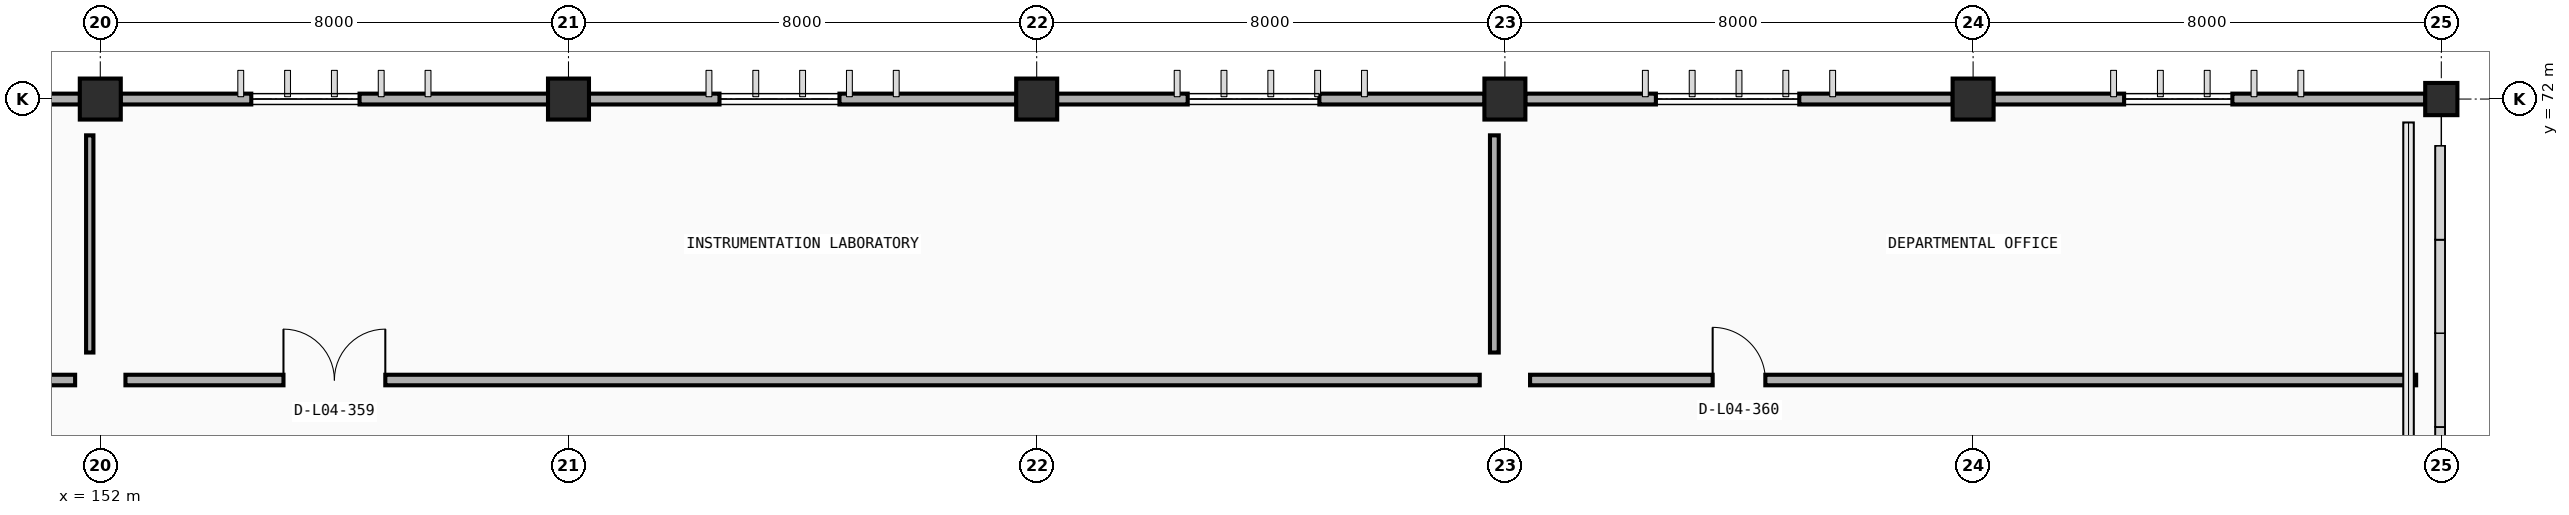
"""IFC4 building model, lengths in metres.
Left out: names, types, materials, properties, quantities, classifications, styles, units other than length and angle.
Written with IfcOpenShell. Run it as: python <this file> out.ifc"""

import sys

from ifc_helpers import new_model, si_unit, direction, frame, frame_2d, origin, origin_2d, place, context, subcontext, project, spatial, rectangle, extrude, element, fill, save


model = new_model("IFC4")
c1 = context("Model", 3, precision=1e-05, world=origin(), true_north=direction((0.0, 1.0)))
c2 = subcontext(c1, "Body", "Model", "MODEL_VIEW")
j1 = project(units=[si_unit("LENGTHUNIT", "METRE"), si_unit("PLANEANGLEUNIT", "RADIAN")], contexts=[c1])
p1 = place(None, origin())
s1 = spatial("IfcSite", under=j1, at=p1, CompositionType="ELEMENT")
p2 = place(p1, origin())
s2 = spatial("IfcBuilding", under=s1, at=p2, CompositionType="ELEMENT")
p3 = place(p2, frame((0.0, 0.0, 13.8)))
s3 = spatial("IfcBuildingStorey", under=s2, at=p3, CompositionType="ELEMENT", Elevation=13.8)
for number, where, z_axis, x_axis in (
    (1, (152.0, 72.0, 0.0), (0.0, 0.0, 1.0), (1.0, 0.0, 0.0)),
    (2, (160.0, 72.0, 0.0), (0.0, 0.0, 1.0), (1.0, 0.0, 0.0)),
    (3, (168.0, 72.0, 0.0), (0.0, 0.0, 1.0), (1.0, 0.0, 0.0)),
    (4, (176.0, 72.0, 0.0), (0.0, 0.0, 1.0), (1.0, 0.0, 0.0)),
    (5, (184.0, 72.0, 0.0), (0.0, 0.0, 1.0), (1.0, 0.0, 0.0)),
):
    element("IfcColumn", number, at=place(p3, frame(where, z_axis=z_axis, x_axis=x_axis)), inside=s3, PredefinedType="COLUMN", context=c2, shape_type="SweptSolid", body=[
        extrude(rectangle(XDim=0.7, YDim=0.7, at=origin_2d()), origin(), (0.0, 0.0, 1.0), 4.2),
    ])
p4 = place(p3, frame((192.0, 72.0, 0.0), z_axis=(0.0, 0.0, 1.0), x_axis=(1.0, 0.0, 0.0)))
e6 = element("IfcColumn", 6, at=p4, inside=s3, PredefinedType="COLUMN", context=c2, shape_type="SweptSolid", body=[
    extrude(rectangle(XDim=0.55, YDim=0.55, at=origin_2d()), origin(), (0.0, 0.0, 1.0), 4.2),
])
p5 = place(p3, frame((144.347, 72.0, 0.0), z_axis=(0.0, 0.0, 1.0), x_axis=(1.0, 0.0, 0.0)))
e7 = element("IfcWall", 7, at=p5, inside=s3, PredefinedType="STANDARD", context=c2, shape_type="SweptSolid", body=[
    extrude(rectangle(XDim=7.306, YDim=0.185, at=frame_2d((3.653, 0.0))), origin(), (0.0, 0.0, 1.0), 3.325),
])
p6 = place(p5, frame((2.233, 0.0, 0.9)))
e8 = element("IfcOpeningElement", 8, at=p6, cuts=e7, PredefinedType="OPENING", context=c2, shape_type="SweptSolid", body=[
    extrude(rectangle(XDim=2.45, YDim=2.0, at=frame_2d((1.225, 1.0))), frame((0.0, 0.103, 0.0), z_axis=(0.0, -1.0, 0.0), x_axis=(1.0, 0.0, 0.0)), (0.0, 0.0, 1.0), 0.205),
])
p7 = place(p3, frame((152.347, 72.0, 0.0), z_axis=(0.0, 0.0, 1.0), x_axis=(1.0, 0.0, 0.0)))
e9 = element("IfcWall", 9, at=p7, inside=s3, PredefinedType="STANDARD", context=c2, shape_type="SweptSolid", body=[
    extrude(rectangle(XDim=7.306, YDim=0.185, at=frame_2d((3.653, 0.0))), origin(), (0.0, 0.0, 1.0), 3.325),
])
p8 = place(p7, frame((2.233, 0.0, 0.9)))
e10 = element("IfcOpeningElement", 10, at=p8, cuts=e9, PredefinedType="OPENING", context=c2, shape_type="SweptSolid", body=[
    extrude(rectangle(XDim=1.85, YDim=2.0, at=frame_2d((0.925, 1.0))), frame((0.0, 0.103, 0.0), z_axis=(0.0, -1.0, 0.0), x_axis=(1.0, 0.0, 0.0)), (0.0, 0.0, 1.0), 0.205),
])
p9 = place(p3, frame((160.347, 72.0, 0.0), z_axis=(0.0, 0.0, 1.0), x_axis=(1.0, 0.0, 0.0)))
e11 = element("IfcWall", 11, at=p9, inside=s3, PredefinedType="STANDARD", context=c2, shape_type="SweptSolid", body=[
    extrude(rectangle(XDim=7.306, YDim=0.185, at=frame_2d((3.653, 0.0))), origin(), (0.0, 0.0, 1.0), 3.325),
])
p10 = place(p9, frame((2.233, 0.0, 0.9)))
e12 = element("IfcOpeningElement", 12, at=p10, cuts=e11, PredefinedType="OPENING", context=c2, shape_type="SweptSolid", body=[
    extrude(rectangle(XDim=2.05, YDim=2.0, at=frame_2d((1.025, 1.0))), frame((0.0, 0.103, 0.0), z_axis=(0.0, -1.0, 0.0), x_axis=(1.0, 0.0, 0.0)), (0.0, 0.0, 1.0), 0.205),
])
p11 = place(p3, frame((168.347, 72.0, 0.0), z_axis=(0.0, 0.0, 1.0), x_axis=(1.0, 0.0, 0.0)))
e13 = element("IfcWall", 13, at=p11, inside=s3, PredefinedType="STANDARD", context=c2, shape_type="SweptSolid", body=[
    extrude(rectangle(XDim=7.306, YDim=0.185, at=frame_2d((3.653, 0.0))), origin(), (0.0, 0.0, 1.0), 3.325),
])
p12 = place(p11, frame((2.233, 0.0, 0.9)))
e14 = element("IfcOpeningElement", 14, at=p12, cuts=e13, PredefinedType="OPENING", context=c2, shape_type="SweptSolid", body=[
    extrude(rectangle(XDim=2.25, YDim=2.0, at=frame_2d((1.125, 1.0))), frame((0.0, 0.103, 0.0), z_axis=(0.0, -1.0, 0.0), x_axis=(1.0, 0.0, 0.0)), (0.0, 0.0, 1.0), 0.205),
])
p13 = place(p3, frame((176.347, 72.0, 0.0), z_axis=(0.0, 0.0, 1.0), x_axis=(1.0, 0.0, 0.0)))
e15 = element("IfcWall", 15, at=p13, inside=s3, PredefinedType="STANDARD", context=c2, shape_type="SweptSolid", body=[
    extrude(rectangle(XDim=7.306, YDim=0.185, at=frame_2d((3.653, 0.0))), origin(), (0.0, 0.0, 1.0), 3.325),
])
p14 = place(p13, frame((2.233, 0.0, 0.9)))
e16 = element("IfcOpeningElement", 16, at=p14, cuts=e15, PredefinedType="OPENING", context=c2, shape_type="SweptSolid", body=[
    extrude(rectangle(XDim=2.45, YDim=2.0, at=frame_2d((1.225, 1.0))), frame((0.0, 0.103, 0.0), z_axis=(0.0, -1.0, 0.0), x_axis=(1.0, 0.0, 0.0)), (0.0, 0.0, 1.0), 0.205),
])
p15 = place(p3, frame((184.347, 72.0, 0.0), z_axis=(0.0, 0.0, 1.0), x_axis=(1.0, 0.0, 0.0)))
e17 = element("IfcWall", 17, at=p15, inside=s3, PredefinedType="STANDARD", context=c2, shape_type="SweptSolid", body=[
    extrude(rectangle(XDim=7.381, YDim=0.185, at=frame_2d((3.69, 0.0))), origin(), (0.0, 0.0, 1.0), 3.325),
])
p16 = place(p15, frame((2.233, 0.0, 0.9)))
e18 = element("IfcOpeningElement", 18, at=p16, cuts=e17, PredefinedType="OPENING", context=c2, shape_type="SweptSolid", body=[
    extrude(rectangle(XDim=1.85, YDim=2.0, at=frame_2d((0.925, 1.0))), frame((0.0, 0.103, 0.0), z_axis=(0.0, -1.0, 0.0), x_axis=(1.0, 0.0, 0.0)), (0.0, 0.0, 1.0), 0.205),
])
p17 = place(p3, frame((191.76, 71.78, 0.0), z_axis=(0.0, 0.0, 1.0), x_axis=(-1.0, 0.0, 0.0)))
e19 = element("IfcWall", 19, at=p17, inside=s3, PredefinedType="PARAPET", context=c2, shape_type="SweptSolid", body=[
    extrude(rectangle(XDim=0.32, YDim=0.2, at=frame_2d((0.16, 0.0))), origin(), (0.0, 0.0, 1.0), 3.35),
])
p18 = place(p3, frame((136.43, 67.2, 0.0), z_axis=(0.0, 0.0, 1.0), x_axis=(1.0, 0.0, 0.0)))
e20 = element("IfcWall", 20, at=p18, inside=s3, PredefinedType="PARTITIONING", context=c2, shape_type="SweptSolid", body=[
    extrude(rectangle(XDim=15.14, YDim=0.18, at=frame_2d((7.57, 0.0))), origin(), (0.0, 0.0, 1.0), 3.3),
])
p19 = place(p18, frame((2.73, 0.0, 0.0)))
e21 = element("IfcOpeningElement", 21, at=p19, cuts=e20, PredefinedType="OPENING", context=c2, shape_type="SweptSolid", body=[
    extrude(rectangle(XDim=1.68, YDim=2.25, at=frame_2d((0.84, 1.125))), frame((0.0, 0.1, 0.0), z_axis=(0.0, -1.0, 0.0), x_axis=(1.0, 0.0, 0.0)), (0.0, 0.0, 1.0), 0.2),
])
p20 = place(p3, frame((151.82, 67.67, 0.0), z_axis=(0.0, 0.0, 1.0), x_axis=(0.0, 1.0, 0.0)))
e22 = element("IfcWall", 22, at=p20, inside=s3, PredefinedType="PARTITIONING", context=c2, shape_type="SweptSolid", body=[
    extrude(rectangle(XDim=3.71, YDim=0.125, at=frame_2d((1.855, 0.0))), origin(), (0.0, 0.0, 1.0), 3.225),
])
p21 = place(p3, frame((152.43, 67.2, 0.0), z_axis=(0.0, 0.0, 1.0), x_axis=(1.0, 0.0, 0.0)))
e23 = element("IfcWall", 23, at=p21, inside=s3, PredefinedType="PARTITIONING", context=c2, shape_type="SweptSolid", body=[
    extrude(rectangle(XDim=23.14, YDim=0.18, at=frame_2d((11.57, 0.0))), origin(), (0.0, 0.0, 1.0), 3.3),
])
p22 = place(p21, frame((2.7, 0.0, 0.0)))
e24 = element("IfcOpeningElement", 24, at=p22, cuts=e23, PredefinedType="OPENING", context=c2, shape_type="SweptSolid", body=[
    extrude(rectangle(XDim=1.74, YDim=2.22, at=frame_2d((0.87, 1.11))), frame((0.0, 0.1, 0.0), z_axis=(0.0, -1.0, 0.0), x_axis=(1.0, 0.0, 0.0)), (0.0, 0.0, 1.0), 0.2),
])
p23 = place(p3, frame((175.82, 67.67, 0.0), z_axis=(0.0, 0.0, 1.0), x_axis=(0.0, 1.0, 0.0)))
e25 = element("IfcWall", 25, at=p23, inside=s3, PredefinedType="PARTITIONING", context=c2, shape_type="SweptSolid", body=[
    extrude(rectangle(XDim=3.71, YDim=0.15, at=frame_2d((1.855, 0.0))), origin(), (0.0, 0.0, 1.0), 3.225),
])
p24 = place(p3, frame((176.43, 67.2, 0.0), z_axis=(0.0, 0.0, 1.0), x_axis=(1.0, 0.0, 0.0)))
e26 = element("IfcWall", 26, at=p24, inside=s3, PredefinedType="PARTITIONING", context=c2, shape_type="SweptSolid", body=[
    extrude(rectangle(XDim=15.14, YDim=0.18, at=frame_2d((7.57, 0.0))), origin(), (0.0, 0.0, 1.0), 3.3),
])
p25 = place(p24, frame((3.12, 0.0, 0.0)))
e27 = element("IfcOpeningElement", 27, at=p25, cuts=e26, PredefinedType="OPENING", context=c2, shape_type="SweptSolid", body=[
    extrude(rectangle(XDim=0.9, YDim=2.1, at=frame_2d((0.45, 1.05))), frame((0.0, 0.1, 0.0), z_axis=(0.0, -1.0, 0.0), x_axis=(1.0, 0.0, 0.0)), (0.0, 0.0, 1.0), 0.2),
])
p26 = place(p8, origin())
e28 = element("IfcWindow", 28, at=p26, inside=s3, PartitioningType="DOUBLE_PANEL_VERTICAL", PredefinedType="WINDOW", context=c2, shape_type="SweptSolid", body=[
    extrude(rectangle(XDim=1.85, YDim=2.0, at=frame_2d((0.925, 1.0))), frame((0.0, 0.03, 0.0), z_axis=(0.0, -1.0, 0.0), x_axis=(1.0, 0.0, 0.0)), (0.0, 0.0, 1.0), 0.06),
])
fill(e10, e28)
p27 = place(p10, origin())
e29 = element("IfcWindow", 29, at=p27, inside=s3, PartitioningType="DOUBLE_PANEL_VERTICAL", PredefinedType="WINDOW", context=c2, shape_type="SweptSolid", body=[
    extrude(rectangle(XDim=2.05, YDim=2.0, at=frame_2d((1.025, 1.0))), frame((0.0, 0.03, 0.0), z_axis=(0.0, -1.0, 0.0), x_axis=(1.0, 0.0, 0.0)), (0.0, 0.0, 1.0), 0.06),
])
fill(e12, e29)
p28 = place(p12, origin())
e30 = element("IfcWindow", 30, at=p28, inside=s3, PartitioningType="DOUBLE_PANEL_VERTICAL", PredefinedType="WINDOW", context=c2, shape_type="SweptSolid", body=[
    extrude(rectangle(XDim=2.25, YDim=2.0, at=frame_2d((1.125, 1.0))), frame((0.0, 0.03, 0.0), z_axis=(0.0, -1.0, 0.0), x_axis=(1.0, 0.0, 0.0)), (0.0, 0.0, 1.0), 0.06),
])
fill(e14, e30)
p29 = place(p14, origin())
e31 = element("IfcWindow", 31, at=p29, inside=s3, PartitioningType="DOUBLE_PANEL_VERTICAL", PredefinedType="WINDOW", context=c2, shape_type="SweptSolid", body=[
    extrude(rectangle(XDim=2.45, YDim=2.0, at=frame_2d((1.225, 1.0))), frame((0.0, 0.03, 0.0), z_axis=(0.0, -1.0, 0.0), x_axis=(1.0, 0.0, 0.0)), (0.0, 0.0, 1.0), 0.06),
])
fill(e16, e31)
p30 = place(p16, origin())
e32 = element("IfcWindow", 32, at=p30, inside=s3, PartitioningType="DOUBLE_PANEL_VERTICAL", PredefinedType="WINDOW", context=c2, shape_type="SweptSolid", body=[
    extrude(rectangle(XDim=1.85, YDim=2.0, at=frame_2d((0.925, 1.0))), frame((0.0, 0.03, 0.0), z_axis=(0.0, -1.0, 0.0), x_axis=(1.0, 0.0, 0.0)), (0.0, 0.0, 1.0), 0.06),
])
fill(e18, e32)
p31 = place(p22, origin())
e33 = element("IfcDoor", 33, at=p31, inside=s3, OperationType="DOUBLE_DOOR_SINGLE_SWING", PredefinedType="DOOR", context=c2, shape_type="SweptSolid", body=[
    extrude(rectangle(XDim=1.74, YDim=2.22, at=frame_2d((0.87, 1.11))), frame((0.0, 0.025, 0.0), z_axis=(0.0, -1.0, 0.0), x_axis=(1.0, 0.0, 0.0)), (0.0, 0.0, 1.0), 0.05),
])
fill(e24, e33)
p32 = place(p25, origin())
e34 = element("IfcDoor", 34, at=p32, inside=s3, OperationType="SINGLE_SWING_LEFT", PredefinedType="DOOR", context=c2, shape_type="SweptSolid", body=[
    extrude(rectangle(XDim=0.9, YDim=2.1, at=frame_2d((0.45, 1.05))), frame((0.0, 0.025, 0.0), z_axis=(0.0, -1.0, 0.0), x_axis=(1.0, 0.0, 0.0)), (0.0, 0.0, 1.0), 0.05),
])
fill(e27, e34)
save(model, sys.argv[1])
